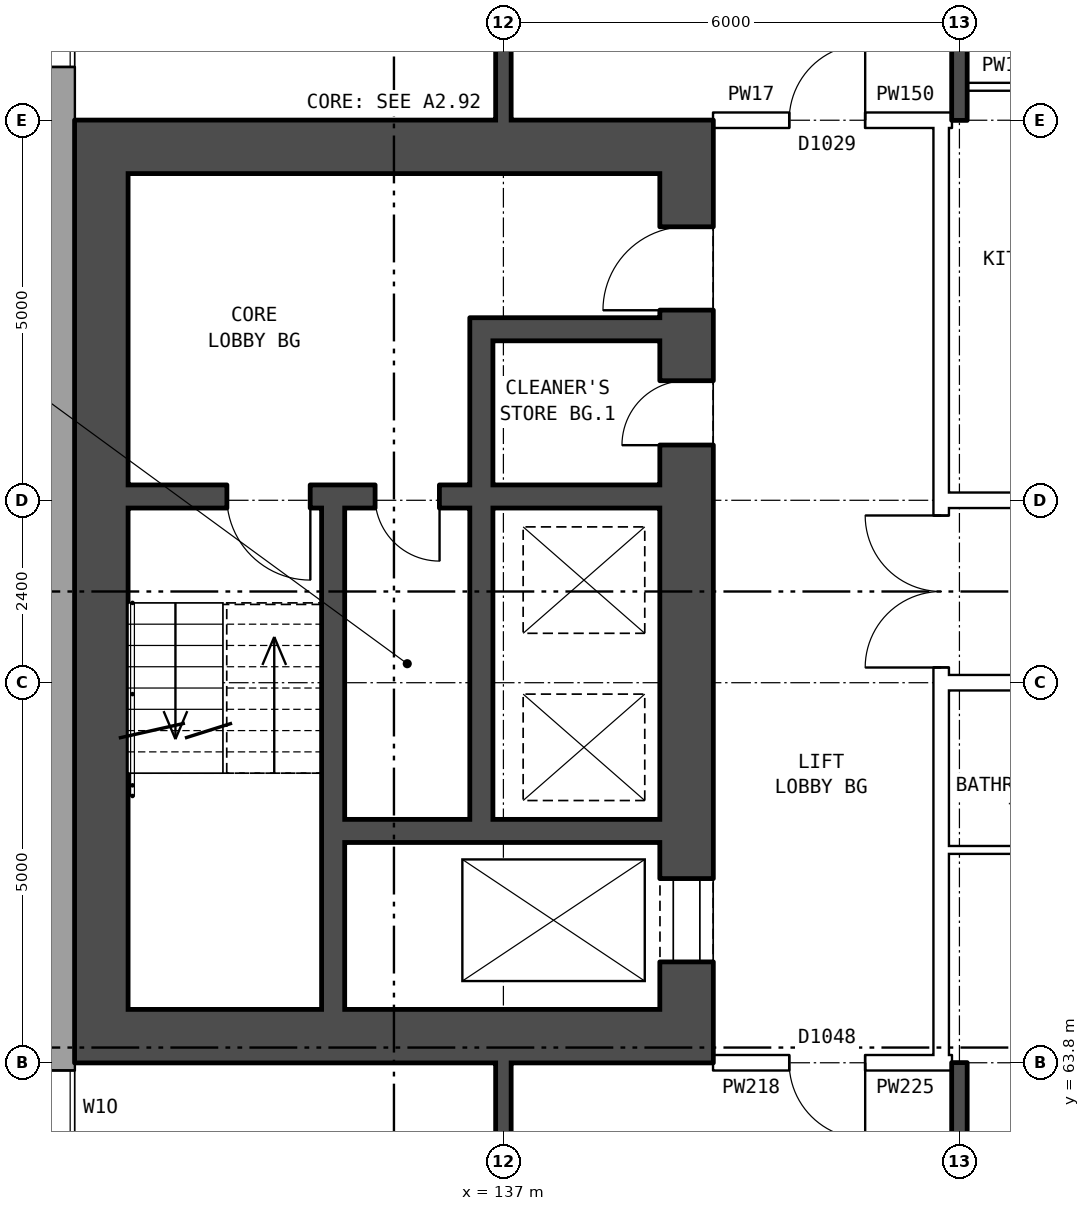
"""IFC4 building model, lengths in metres.
Left out: names, types, materials, properties, quantities, classifications, styles, units other than length and angle.
Written with IfcOpenShell. Run it as: python <this file> out.ifc"""

import sys

from ifc_helpers import new_model, si_unit, direction, frame, frame_2d, origin, place, context, subcontext, project, spatial, rectangle, extrude, element, fill, save


model = new_model("IFC4")
c1 = context("Model", 3, precision=1e-05, world=origin(), true_north=direction((0.0, 1.0)))
c2 = subcontext(c1, "Body", "Model", "MODEL_VIEW")
j1 = project(units=[si_unit("LENGTHUNIT", "METRE"), si_unit("PLANEANGLEUNIT", "RADIAN")], contexts=[c1])
p1 = place(None, origin())
s1 = spatial("IfcSite", under=j1, at=p1, CompositionType="ELEMENT")
p2 = place(p1, origin())
s2 = spatial("IfcBuilding", under=s1, at=p2, CompositionType="ELEMENT")
p3 = place(p2, frame((0.0, 0.0, 80.9)))
s3 = spatial("IfcBuildingStorey", under=s2, at=p3, CompositionType="ELEMENT", Elevation=80.9)
p4 = place(p3, frame((131.18, 82.925, 0.0), z_axis=(0.0, 0.0, 1.0), x_axis=(0.0, -1.0, 0.0)))
e1 = element("IfcWall", 1, at=p4, inside=s3, PredefinedType="STANDARD", context=c2, shape_type="SweptSolid", body=[
    extrude(rectangle(XDim=25.851, YDim=0.36, at=frame_2d((12.925, 0.0))), origin(), (0.0, 0.0, 1.0), 2.85),
])
p5 = place(p4, frame((1.625, 0.0, 0.8)))
e2 = element("IfcOpeningElement", 2, at=p5, cuts=e1, PredefinedType="OPENING", context=c2, shape_type="SweptSolid", body=[
    extrude(rectangle(XDim=1.6, YDim=1.8, at=frame_2d((0.8, 0.9))), frame((0.0, 0.19, 0.0), z_axis=(0.0, -1.0, 0.0), x_axis=(1.0, 0.0, 0.0)), (0.0, 0.0, 1.0), 0.38),
])
p6 = place(p4, frame((3.525, 0.0, 0.8)))
e3 = element("IfcOpeningElement", 3, at=p6, cuts=e1, PredefinedType="OPENING", context=c2, shape_type="SweptSolid", body=[
    extrude(rectangle(XDim=1.4, YDim=1.8, at=frame_2d((0.7, 0.9))), frame((0.0, 0.19, 0.0), z_axis=(0.0, -1.0, 0.0), x_axis=(1.0, 0.0, 0.0)), (0.0, 0.0, 1.0), 0.38),
])
p7 = place(p4, frame((19.225, 0.0, 0.8)))
e4 = element("IfcOpeningElement", 4, at=p7, cuts=e1, PredefinedType="OPENING", context=c2, shape_type="SweptSolid", body=[
    extrude(rectangle(XDim=1.0, YDim=1.2, at=frame_2d((0.5, 0.6))), frame((0.0, 0.19, 0.0), z_axis=(0.0, -1.0, 0.0), x_axis=(1.0, 0.0, 0.0)), (0.0, 0.0, 1.0), 0.38),
])
p8 = place(p4, frame((22.625, 0.0, 0.8)))
e5 = element("IfcOpeningElement", 5, at=p8, cuts=e1, PredefinedType="OPENING", context=c2, shape_type="SweptSolid", body=[
    extrude(rectangle(XDim=1.6, YDim=1.8, at=frame_2d((0.8, 0.9))), frame((0.0, 0.19, 0.0), z_axis=(0.0, -1.0, 0.0), x_axis=(1.0, 0.0, 0.0)), (0.0, 0.0, 1.0), 0.38),
])
p9 = place(p4, frame((5.225, 0.0, 0.8)))
e6 = element("IfcOpeningElement", 6, at=p9, cuts=e1, PredefinedType="OPENING", context=c2, shape_type="SweptSolid", body=[
    extrude(rectangle(XDim=0.8, YDim=1.5, at=frame_2d((0.4, 0.75))), frame((0.0, 0.19, 0.0), z_axis=(0.0, -1.0, 0.0), x_axis=(1.0, 0.0, 0.0)), (0.0, 0.0, 1.0), 0.38),
])
p10 = place(p4, frame((20.525, 0.0, 0.8)))
e7 = element("IfcOpeningElement", 7, at=p10, cuts=e1, PredefinedType="OPENING", context=c2, shape_type="SweptSolid", body=[
    extrude(rectangle(XDim=1.4, YDim=1.8, at=frame_2d((0.7, 0.9))), frame((0.0, 0.19, 0.0), z_axis=(0.0, -1.0, 0.0), x_axis=(1.0, 0.0, 0.0)), (0.0, 0.0, 1.0), 0.38),
])
p11 = place(p3, frame((139.41, 64.5, 0.0), z_axis=(0.0, 0.0, 1.0), x_axis=(0.0, 1.0, 0.0)))
e8 = element("IfcWall", 8, at=p11, inside=s3, PredefinedType="SHEAR", context=c2, shape_type="SweptSolid", body=[
    extrude(rectangle(XDim=11.0, YDim=0.7, at=frame_2d((5.5, 0.0))), origin(), (0.0, 0.0, 1.0), 2.85),
])
p12 = place(p11, frame((0.625, 0.0, 0.0)))
e9 = element("IfcOpeningElement", 9, at=p12, cuts=e8, PredefinedType="OPENING", context=c2, shape_type="SweptSolid", body=[
    extrude(rectangle(XDim=1.1, YDim=2.1, at=frame_2d((0.55, 1.05))), frame((0.0, 0.36, 0.0), z_axis=(0.0, -1.0, 0.0), x_axis=(1.0, 0.0, 0.0)), (0.0, 0.0, 1.0), 0.72),
])
p13 = place(p11, frame((9.2, 0.0, 0.0)))
e10 = element("IfcOpeningElement", 10, at=p13, cuts=e8, PredefinedType="OPENING", context=c2, shape_type="SweptSolid", body=[
    extrude(rectangle(XDim=1.1, YDim=2.1, at=frame_2d((0.55, 1.05))), frame((0.0, 0.36, 0.0), z_axis=(0.0, -1.0, 0.0), x_axis=(1.0, 0.0, 0.0)), (0.0, 0.0, 1.0), 0.72),
])
p14 = place(p11, frame((7.425, 0.0, 0.0)))
e11 = element("IfcOpeningElement", 11, at=p14, cuts=e8, PredefinedType="OPENING", context=c2, shape_type="SweptSolid", body=[
    extrude(rectangle(XDim=0.85, YDim=2.1, at=frame_2d((0.425, 1.05))), frame((0.0, 0.36, 0.0), z_axis=(0.0, -1.0, 0.0), x_axis=(1.0, 0.0, 0.0)), (0.0, 0.0, 1.0), 0.72),
])
p15 = place(p3, frame((131.71, 64.5, 0.0), z_axis=(0.0, 0.0, 1.0), x_axis=(0.0, 1.0, 0.0)))
e12 = element("IfcWall", 12, at=p15, inside=s3, PredefinedType="SHEAR", context=c2, shape_type="SweptSolid", body=[
    extrude(rectangle(XDim=11.0, YDim=0.7, at=frame_2d((5.5, 0.0))), origin(), (0.0, 0.0, 1.0), 2.85),
])
for number, where, z_axis, x_axis in (
    (13, (139.76, 64.15, 0.0), (0.0, 0.0, 1.0), (-1.0, 0.0, 0.0)),
    (14, (139.76, 75.85, 0.0), (0.0, 0.0, 1.0), (-1.0, 0.0, 0.0)),
):
    element("IfcWall", number, at=place(p3, frame(where, z_axis=z_axis, x_axis=x_axis)), inside=s3, PredefinedType="SHEAR", context=c2, shape_type="SweptSolid", body=[
        extrude(rectangle(XDim=8.4, YDim=0.7, at=frame_2d((4.2, 0.0))), origin(), (0.0, 0.0, 1.0), 2.85),
    ])
p16 = place(p3, frame((139.06, 66.85, 0.0), z_axis=(0.0, 0.0, 1.0), x_axis=(-1.0, 0.0, 0.0)))
e15 = element("IfcWall", 15, at=p16, inside=s3, PredefinedType="SHEAR", context=c2, shape_type="SweptSolid", body=[
    extrude(rectangle(XDim=4.15, YDim=0.3, at=frame_2d((2.075, 0.0))), origin(), (0.0, 0.0, 1.0), 2.85),
])
p17 = place(p3, frame((139.06, 71.25, 0.0), z_axis=(0.0, 0.0, 1.0), x_axis=(-1.0, 0.0, 0.0)))
e16 = element("IfcWall", 16, at=p17, inside=s3, PredefinedType="SHEAR", context=c2, shape_type="SweptSolid", body=[
    extrude(rectangle(XDim=7.0, YDim=0.3, at=frame_2d((3.5, 0.0))), origin(), (0.0, 0.0, 1.0), 2.85),
])
p18 = place(p17, frame((4.6, 0.0, 0.0)))
e17 = element("IfcOpeningElement", 17, at=p18, cuts=e16, PredefinedType="OPENING", context=c2, shape_type="SweptSolid", body=[
    extrude(rectangle(XDim=1.1, YDim=2.1, at=frame_2d((0.55, 1.05))), frame((0.0, 0.16, 0.0), z_axis=(0.0, -1.0, 0.0), x_axis=(1.0, 0.0, 0.0)), (0.0, 0.0, 1.0), 0.32),
])
p19 = place(p17, frame((2.9, 0.0, 0.0)))
e18 = element("IfcOpeningElement", 18, at=p19, cuts=e16, PredefinedType="OPENING", context=c2, shape_type="SweptSolid", body=[
    extrude(rectangle(XDim=0.85, YDim=2.1, at=frame_2d((0.425, 1.05))), frame((0.0, 0.16, 0.0), z_axis=(0.0, -1.0, 0.0), x_axis=(1.0, 0.0, 0.0)), (0.0, 0.0, 1.0), 0.32),
])
p20 = place(p3, frame((139.06, 73.45, 0.0), z_axis=(0.0, 0.0, 1.0), x_axis=(-1.0, 0.0, 0.0)))
e19 = element("IfcWall", 19, at=p20, inside=s3, PredefinedType="SHEAR", context=c2, shape_type="SweptSolid", body=[
    extrude(rectangle(XDim=2.2, YDim=0.3, at=frame_2d((1.1, 0.0))), origin(), (0.0, 0.0, 1.0), 2.85),
])
p21 = place(p3, frame((136.71, 67.0, 0.0), z_axis=(0.0, 0.0, 1.0), x_axis=(0.0, 1.0, 0.0)))
e20 = element("IfcWall", 20, at=p21, inside=s3, PredefinedType="SHEAR", context=c2, shape_type="SweptSolid", body=[
    extrude(rectangle(XDim=4.1, YDim=0.3, at=frame_2d((2.05, 0.0))), origin(), (0.0, 0.0, 1.0), 2.85),
])
p22 = place(p3, frame((136.71, 71.4, 0.0), z_axis=(0.0, 0.0, 1.0), x_axis=(0.0, 1.0, 0.0)))
e21 = element("IfcWall", 21, at=p22, inside=s3, PredefinedType="SHEAR", context=c2, shape_type="SweptSolid", body=[
    extrude(rectangle(XDim=2.2, YDim=0.3, at=frame_2d((1.1, 0.0))), origin(), (0.0, 0.0, 1.0), 2.85),
])
p23 = place(p3, frame((134.76, 64.5, 0.0), z_axis=(0.0, 0.0, 1.0), x_axis=(0.0, 1.0, 0.0)))
e22 = element("IfcWall", 22, at=p23, inside=s3, PredefinedType="SHEAR", context=c2, shape_type="SweptSolid", body=[
    extrude(rectangle(XDim=6.6, YDim=0.3, at=frame_2d((3.3, 0.0))), origin(), (0.0, 0.0, 1.0), 2.85),
])
p24 = place(p3, frame((142.76, 63.9, 0.0), z_axis=(0.0, 0.0, 1.0), x_axis=(0.0, 1.0, 0.0)))
e23 = element("IfcWall", 23, at=p24, inside=s3, PredefinedType="PARTITIONING", context=c2, shape_type="SweptSolid", body=[
    extrude(rectangle(XDim=12.2, YDim=0.2, at=frame_2d((6.1, 0.0))), origin(), (0.0, 0.0, 1.0), 2.85),
])
p25 = place(p24, frame((5.1, 0.0, 0.0)))
e24 = element("IfcOpeningElement", 24, at=p25, cuts=e23, PredefinedType="OPENING", context=c2, shape_type="SweptSolid", body=[
    extrude(rectangle(XDim=2.0, YDim=2.1, at=frame_2d((1.0, 1.05))), frame((0.0, 0.11, 0.0), z_axis=(0.0, -1.0, 0.0), x_axis=(1.0, 0.0, 0.0)), (0.0, 0.0, 1.0), 0.22),
])
p26 = place(p3, frame((139.76, 63.8, 0.0), z_axis=(0.0, 0.0, 1.0), x_axis=(1.0, 0.0, 0.0)))
e25 = element("IfcWall", 25, at=p26, inside=s3, PredefinedType="PARTITIONING", context=c2, shape_type="SweptSolid", body=[
    extrude(rectangle(XDim=3.0, YDim=0.2, at=frame_2d((1.5, 0.0))), origin(), (0.0, 0.0, 1.0), 2.85),
])
p27 = place(p26, frame((1.0, 0.0, 0.0)))
e26 = element("IfcOpeningElement", 26, at=p27, cuts=e25, PredefinedType="OPENING", context=c2, shape_type="SweptSolid", body=[
    extrude(rectangle(XDim=1.0, YDim=2.1, at=frame_2d((0.5, 1.05))), frame((0.0, 0.11, 0.0), z_axis=(0.0, -1.0, 0.0), x_axis=(1.0, 0.0, 0.0)), (0.0, 0.0, 1.0), 0.22),
])
p28 = place(p3, frame((142.76, 63.8, 0.0), z_axis=(0.0, 0.0, 1.0), x_axis=(1.0, 0.0, 0.0)))
e27 = element("IfcWall", 27, at=p28, inside=s3, PredefinedType="PARTITIONING", context=c2, shape_type="SweptSolid", body=[
    extrude(rectangle(XDim=0.14, YDim=0.2, at=frame_2d((0.07, 0.0))), origin(), (0.0, 0.0, 1.0), 2.85),
])
p29 = place(p3, frame((142.76, 66.6, 0.0), z_axis=(0.0, 0.0, 1.0), x_axis=(1.0, 0.0, 0.0)))
e28 = element("IfcWall", 28, at=p29, inside=s3, PredefinedType="PARTITIONING", context=c2, shape_type="SweptSolid", body=[
    extrude(rectangle(XDim=3.24, YDim=0.1, at=frame_2d((1.62, 0.0))), origin(), (0.0, 0.0, 1.0), 2.85),
])
p30 = place(p3, frame((142.76, 68.8, 0.0), z_axis=(0.0, 0.0, 1.0), x_axis=(1.0, 0.0, 0.0)))
e29 = element("IfcWall", 29, at=p30, inside=s3, PredefinedType="PARTITIONING", context=c2, shape_type="SweptSolid", body=[
    extrude(rectangle(XDim=14.48, YDim=0.2, at=frame_2d((7.24, 0.0))), origin(), (0.0, 0.0, 1.0), 2.85),
])
p31 = place(p30, frame((4.24, 0.0, 0.0)))
e30 = element("IfcOpeningElement", 30, at=p31, cuts=e29, PredefinedType="OPENING", context=c2, shape_type="SweptSolid", body=[
    extrude(rectangle(XDim=1.0, YDim=2.1, at=frame_2d((0.5, 1.05))), frame((0.0, 0.11, 0.0), z_axis=(0.0, -1.0, 0.0), x_axis=(1.0, 0.0, 0.0)), (0.0, 0.0, 1.0), 0.22),
])
p32 = place(p30, frame((10.24, 0.0, 0.0)))
e31 = element("IfcOpeningElement", 31, at=p32, cuts=e29, PredefinedType="OPENING", context=c2, shape_type="SweptSolid", body=[
    extrude(rectangle(XDim=1.0, YDim=2.1, at=frame_2d((0.5, 1.05))), frame((0.0, 0.11, 0.0), z_axis=(0.0, -1.0, 0.0), x_axis=(1.0, 0.0, 0.0)), (0.0, 0.0, 1.0), 0.22),
])
p33 = place(p3, frame((142.76, 71.2, 0.0), z_axis=(0.0, 0.0, 1.0), x_axis=(1.0, 0.0, 0.0)))
e32 = element("IfcWall", 32, at=p33, inside=s3, PredefinedType="PARTITIONING", context=c2, shape_type="SweptSolid", body=[
    extrude(rectangle(XDim=14.48, YDim=0.2, at=frame_2d((7.24, 0.0))), origin(), (0.0, 0.0, 1.0), 2.85),
])
p34 = place(p33, frame((1.12, 0.0, 0.0)))
e33 = element("IfcOpeningElement", 33, at=p34, cuts=e32, PredefinedType="OPENING", context=c2, shape_type="SweptSolid", body=[
    extrude(rectangle(XDim=1.0, YDim=2.1, at=frame_2d((0.5, 1.05))), frame((0.0, 0.11, 0.0), z_axis=(0.0, -1.0, 0.0), x_axis=(1.0, 0.0, 0.0)), (0.0, 0.0, 1.0), 0.22),
])
p35 = place(p33, frame((10.24, 0.0, 0.0)))
e34 = element("IfcOpeningElement", 34, at=p35, cuts=e32, PredefinedType="OPENING", context=c2, shape_type="SweptSolid", body=[
    extrude(rectangle(XDim=1.0, YDim=2.1, at=frame_2d((0.5, 1.05))), frame((0.0, 0.11, 0.0), z_axis=(0.0, -1.0, 0.0), x_axis=(1.0, 0.0, 0.0)), (0.0, 0.0, 1.0), 0.22),
])
p36 = place(p3, frame((139.76, 76.2, 0.0), z_axis=(0.0, 0.0, 1.0), x_axis=(1.0, 0.0, 0.0)))
e35 = element("IfcWall", 35, at=p36, inside=s3, PredefinedType="PARTITIONING", context=c2, shape_type="SweptSolid", body=[
    extrude(rectangle(XDim=3.0, YDim=0.2, at=frame_2d((1.5, 0.0))), origin(), (0.0, 0.0, 1.0), 2.85),
])
p37 = place(p36, frame((1.0, 0.0, 0.0)))
e36 = element("IfcOpeningElement", 36, at=p37, cuts=e35, PredefinedType="OPENING", context=c2, shape_type="SweptSolid", body=[
    extrude(rectangle(XDim=1.0, YDim=2.1, at=frame_2d((0.5, 1.05))), frame((0.0, 0.11, 0.0), z_axis=(0.0, -1.0, 0.0), x_axis=(1.0, 0.0, 0.0)), (0.0, 0.0, 1.0), 0.22),
])
p38 = place(p3, frame((142.76, 76.2, 0.0), z_axis=(0.0, 0.0, 1.0), x_axis=(1.0, 0.0, 0.0)))
e37 = element("IfcWall", 37, at=p38, inside=s3, PredefinedType="PARTITIONING", context=c2, shape_type="SweptSolid", body=[
    extrude(rectangle(XDim=0.14, YDim=0.2, at=frame_2d((0.07, 0.0))), origin(), (0.0, 0.0, 1.0), 2.85),
])
p39 = place(p3, frame((143.1, 76.64, 0.0), z_axis=(0.0, 0.0, 1.0), x_axis=(1.0, 0.0, 0.0)))
e38 = element("IfcWall", 38, at=p39, inside=s3, PredefinedType="PARTITIONING", context=c2, shape_type="SweptSolid", body=[
    extrude(rectangle(XDim=2.9, YDim=0.1, at=frame_2d((1.45, 0.0))), origin(), (0.0, 0.0, 1.0), 2.85),
])
p40 = place(p39, frame((1.0, 0.0, 0.0)))
e39 = element("IfcOpeningElement", 39, at=p40, cuts=e38, PredefinedType="OPENING", context=c2, shape_type="SweptSolid", body=[
    extrude(rectangle(XDim=0.9, YDim=2.1, at=frame_2d((0.45, 1.05))), frame((0.0, 0.06, 0.0), z_axis=(0.0, -1.0, 0.0), x_axis=(1.0, 0.0, 0.0)), (0.0, 0.0, 1.0), 0.12),
])
p41 = place(p3, frame((137.0, 54.36, 0.0), z_axis=(0.0, 0.0, 1.0), x_axis=(0.0, 1.0, 0.0)))
e40 = element("IfcWall", 40, at=p41, inside=s3, PredefinedType="SOLIDWALL", context=c2, shape_type="SweptSolid", body=[
    extrude(rectangle(XDim=9.44, YDim=0.2, at=frame_2d((4.72, 0.0))), origin(), (0.0, 0.0, 1.0), 2.85),
])
p42 = place(p41, frame((1.37, 0.0, 0.0)))
e41 = element("IfcOpeningElement", 41, at=p42, cuts=e40, PredefinedType="OPENING", context=c2, shape_type="SweptSolid", body=[
    extrude(rectangle(XDim=0.9, YDim=2.1, at=frame_2d((0.45, 1.05))), frame((0.0, 0.11, 0.0), z_axis=(0.0, -1.0, 0.0), x_axis=(1.0, 0.0, 0.0)), (0.0, 0.0, 1.0), 0.22),
])
p43 = place(p41, frame((7.34, 0.0, 0.0)))
e42 = element("IfcOpeningElement", 42, at=p43, cuts=e40, PredefinedType="OPENING", context=c2, shape_type="SweptSolid", body=[
    extrude(rectangle(XDim=0.9, YDim=2.1, at=frame_2d((0.45, 1.05))), frame((0.0, 0.11, 0.0), z_axis=(0.0, -1.0, 0.0), x_axis=(1.0, 0.0, 0.0)), (0.0, 0.0, 1.0), 0.22),
])
p44 = place(p3, frame((137.0, 76.2, 0.0), z_axis=(0.0, 0.0, 1.0), x_axis=(0.0, 1.0, 0.0)))
e43 = element("IfcWall", 43, at=p44, inside=s3, PredefinedType="SOLIDWALL", context=c2, shape_type="SweptSolid", body=[
    extrude(rectangle(XDim=9.44, YDim=0.2, at=frame_2d((4.72, 0.0))), origin(), (0.0, 0.0, 1.0), 2.85),
])
p45 = place(p44, frame((1.2, 0.0, 0.0)))
e44 = element("IfcOpeningElement", 44, at=p45, cuts=e43, PredefinedType="OPENING", context=c2, shape_type="SweptSolid", body=[
    extrude(rectangle(XDim=0.9, YDim=2.1, at=frame_2d((0.45, 1.05))), frame((0.0, 0.11, 0.0), z_axis=(0.0, -1.0, 0.0), x_axis=(1.0, 0.0, 0.0)), (0.0, 0.0, 1.0), 0.22),
])
for number, where, z_axis, x_axis in (
    (45, (143.0, 54.36, 0.0), (0.0, 0.0, 1.0), (0.0, 1.0, 0.0)),
    (46, (143.0, 76.2, 0.0), (0.0, 0.0, 1.0), (0.0, 1.0, 0.0)),
):
    element("IfcWall", number, at=place(p3, frame(where, z_axis=z_axis, x_axis=x_axis)), inside=s3, PredefinedType="SOLIDWALL", context=c2, shape_type="SweptSolid", body=[
        extrude(rectangle(XDim=9.44, YDim=0.2, at=frame_2d((4.72, 0.0))), origin(), (0.0, 0.0, 1.0), 2.85),
    ])
p46 = place(p7, origin())
e47 = element("IfcWindow", 47, at=p46, inside=s3, PartitioningType="SINGLE_PANEL", PredefinedType="WINDOW", context=c2, shape_type="SweptSolid", body=[
    extrude(rectangle(XDim=1.0, YDim=1.2, at=frame_2d((0.5, 0.6))), frame((0.0, 0.15, 0.0), z_axis=(0.0, -1.0, 0.0), x_axis=(1.0, 0.0, 0.0)), (0.0, 0.0, 1.0), 0.06),
])
fill(e4, e47)
p47 = place(p12, origin())
e48 = element("IfcDoor", 48, at=p47, inside=s3, OperationType="DOUBLE_DOOR_SLIDING", PredefinedType="DOOR", context=c2, shape_type="SweptSolid", body=[
    extrude(rectangle(XDim=1.1, YDim=2.1, at=frame_2d((0.55, 1.05))), frame((0.0, 0.335, 0.0), z_axis=(0.0, -1.0, 0.0), x_axis=(1.0, 0.0, 0.0)), (0.0, 0.0, 1.0), 0.05),
])
fill(e9, e48)
p48 = place(p13, origin())
e49 = element("IfcDoor", 49, at=p48, inside=s3, OperationType="SINGLE_SWING_LEFT", PredefinedType="DOOR", context=c2, shape_type="SweptSolid", body=[
    extrude(rectangle(XDim=1.1, YDim=2.1, at=frame_2d((0.55, 1.05))), frame((0.0, 0.335, 0.0), z_axis=(0.0, -1.0, 0.0), x_axis=(1.0, 0.0, 0.0)), (0.0, 0.0, 1.0), 0.05),
])
fill(e10, e49)
p49 = place(p18, origin())
e50 = element("IfcDoor", 50, at=p49, inside=s3, OperationType="SINGLE_SWING_LEFT", PredefinedType="DOOR", context=c2, shape_type="SweptSolid", body=[
    extrude(rectangle(XDim=1.1, YDim=2.1, at=frame_2d((0.55, 1.05))), frame((0.0, 0.025, 0.0), z_axis=(0.0, -1.0, 0.0), x_axis=(1.0, 0.0, 0.0)), (0.0, 0.0, 1.0), 0.05),
])
fill(e17, e50)
p50 = place(p14, origin())
e51 = element("IfcDoor", 51, at=p50, inside=s3, OperationType="SINGLE_SWING_LEFT", PredefinedType="DOOR", context=c2, shape_type="SweptSolid", body=[
    extrude(rectangle(XDim=0.85, YDim=2.1, at=frame_2d((0.425, 1.05))), frame((0.0, 0.335, 0.0), z_axis=(0.0, -1.0, 0.0), x_axis=(1.0, 0.0, 0.0)), (0.0, 0.0, 1.0), 0.05),
])
fill(e11, e51)
p51 = place(p19, origin())
e52 = element("IfcDoor", 52, at=p51, inside=s3, OperationType="SINGLE_SWING_LEFT", PredefinedType="DOOR", context=c2, shape_type="SweptSolid", body=[
    extrude(rectangle(XDim=0.85, YDim=2.1, at=frame_2d((0.425, 1.05))), frame((0.0, 0.025, 0.0), z_axis=(0.0, -1.0, 0.0), x_axis=(1.0, 0.0, 0.0)), (0.0, 0.0, 1.0), 0.05),
])
fill(e18, e52)
p52 = place(p25, origin())
e53 = element("IfcDoor", 53, at=p52, inside=s3, OperationType="DOUBLE_DOOR_SINGLE_SWING", PredefinedType="DOOR", context=c2, shape_type="SweptSolid", body=[
    extrude(rectangle(XDim=2.0, YDim=2.1, at=frame_2d((1.0, 1.05))), frame((0.0, 0.025, 0.0), z_axis=(0.0, -1.0, 0.0), x_axis=(1.0, 0.0, 0.0)), (0.0, 0.0, 1.0), 0.05),
])
fill(e24, e53)
p53 = place(p27, frame((1.0, 0.0, 0.0), z_axis=(0.0, 0.0, 1.0), x_axis=(-1.0, 0.0, 0.0)))
e54 = element("IfcDoor", 54, at=p53, inside=s3, OperationType="SINGLE_SWING_LEFT", PredefinedType="DOOR", context=c2, shape_type="SweptSolid", body=[
    extrude(rectangle(XDim=1.0, YDim=2.1, at=frame_2d((0.5, 1.05))), frame((0.0, 0.025, 0.0), z_axis=(0.0, -1.0, 0.0), x_axis=(1.0, 0.0, 0.0)), (0.0, 0.0, 1.0), 0.05),
])
fill(e26, e54)
p54 = place(p37, origin())
e55 = element("IfcDoor", 55, at=p54, inside=s3, OperationType="SINGLE_SWING_RIGHT", PredefinedType="DOOR", context=c2, shape_type="SweptSolid", body=[
    extrude(rectangle(XDim=1.0, YDim=2.1, at=frame_2d((0.5, 1.05))), frame((0.0, 0.025, 0.0), z_axis=(0.0, -1.0, 0.0), x_axis=(1.0, 0.0, 0.0)), (0.0, 0.0, 1.0), 0.05),
])
fill(e36, e55)
p55 = place(p9, origin())
e56 = element("IfcWindow", 56, at=p55, inside=s3, PartitioningType="SINGLE_PANEL", PredefinedType="WINDOW", context=c2, shape_type="SweptSolid", body=[
    extrude(rectangle(XDim=0.8, YDim=1.5, at=frame_2d((0.4, 0.75))), frame((0.0, 0.15, 0.0), z_axis=(0.0, -1.0, 0.0), x_axis=(1.0, 0.0, 0.0)), (0.0, 0.0, 1.0), 0.06),
])
fill(e6, e56)
save(model, sys.argv[1])
